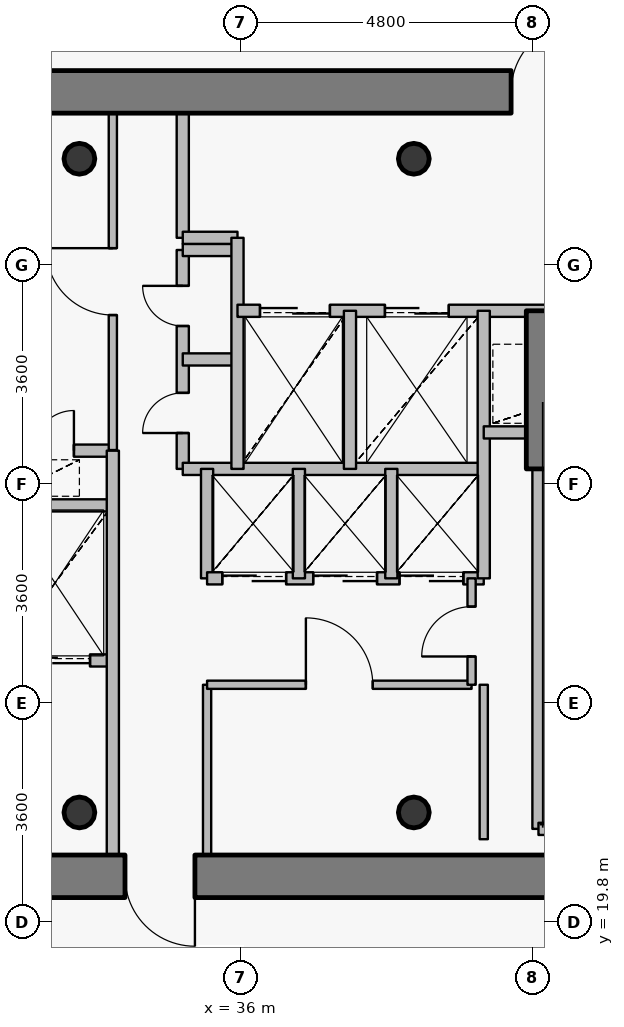
"""IFC4 building model, lengths in metres.
Left out: names, types, materials, properties, quantities, classifications, styles, units other than length and angle.
Written with IfcOpenShell. Run it as: python <this file> out.ifc"""

import sys

from ifc_helpers import new_model, si_unit, direction, frame, frame_2d, origin, origin_2d, place, context, subcontext, project, spatial, rectangle, hollow_circle, extrude, source, transform, mapped, element, fill, save


model = new_model("IFC4")
c1 = context("Model", 3, precision=1e-05, world=origin(), true_north=direction((0.0, 1.0)))
c2 = subcontext(c1, "Body", "Model", "MODEL_VIEW")
j1 = project(units=[si_unit("LENGTHUNIT", "METRE"), si_unit("PLANEANGLEUNIT", "RADIAN")], contexts=[c1])
p1 = place(None, origin())
s1 = spatial("IfcSite", under=j1, at=p1, CompositionType="ELEMENT")
p2 = place(p1, origin())
s2 = spatial("IfcBuilding", under=s1, at=p2, CompositionType="ELEMENT")
p3 = place(p2, frame((0.0, 0.0, 359.4)))
s3 = spatial("IfcBuildingStorey", under=s2, at=p3, CompositionType="ELEMENT", Elevation=359.4)
for number, where, z_axis, x_axis in (
    (1, (33.35, 21.6, 0.0), (0.0, 0.0, 1.0), (1.0, 0.0, 0.0)),
    (2, (38.85, 21.6, 0.0), (0.0, 0.0, 1.0), (1.0, 0.0, 0.0)),
    (3, (38.85, 32.35, 0.0), (0.0, 0.0, 1.0), (1.0, 0.0, 0.0)),
    (4, (33.35, 32.35, 0.0), (0.0, 0.0, 1.0), (1.0, 0.0, 0.0)),
):
    element("IfcColumn", number, at=place(p3, frame(where, z_axis=z_axis, x_axis=x_axis)), inside=s3, PredefinedType="COLUMN", context=c2, shape_type="SweptSolid", body=[
        extrude(hollow_circle(Radius=0.254, WallThickness=0.02, at=origin_2d()), origin(), (0.0, 0.0, 1.0), 4.2),
    ])
p4 = place(p3, frame((27.6, 33.45, 0.0), z_axis=(0.0, 0.0, 1.0), x_axis=(1.0, 0.0, 0.0)))
e5 = element("IfcWall", 5, at=p4, inside=s3, PredefinedType="SHEAR", context=c2, shape_type="SweptSolid", body=[
    extrude(rectangle(XDim=16.8, YDim=0.7, at=frame_2d((8.4, 0.0))), origin(), (0.0, 0.0, 1.0), 3.45),
])
p5 = place(p4, frame((12.85, 0.0, 0.0)))
e6 = element("IfcOpeningElement", 6, at=p5, cuts=e5, PredefinedType="OPENING", context=c2, shape_type="SweptSolid", body=[
    extrude(rectangle(XDim=1.15, YDim=2.15, at=origin_2d()), frame((0.575, 0.36, 1.075), z_axis=(0.0, -1.0, 0.0), x_axis=(1.0, 0.0, 0.0)), (0.0, 0.0, 1.0), 0.72),
])
p6 = place(p3, frame((44.4, 20.55, 0.0), z_axis=(0.0, 0.0, 1.0), x_axis=(-1.0, 0.0, 0.0)))
e7 = element("IfcWall", 7, at=p6, inside=s3, PredefinedType="SHEAR", context=c2, shape_type="SweptSolid", body=[
    extrude(rectangle(XDim=16.8, YDim=0.7, at=frame_2d((8.4, 0.0))), origin(), (0.0, 0.0, 1.0), 3.45),
])
p7 = place(p6, frame((13.0, 0.0, 0.0)))
e8 = element("IfcOpeningElement", 8, at=p7, cuts=e7, PredefinedType="OPENING", context=c2, shape_type="SweptSolid", body=[
    extrude(rectangle(XDim=1.15, YDim=2.15, at=origin_2d()), frame((0.575, 0.36, 1.075), z_axis=(0.0, -1.0, 0.0), x_axis=(1.0, 0.0, 0.0)), (0.0, 0.0, 1.0), 0.72),
])
p8 = place(p6, frame((9.15, 0.0, 0.0)))
e9 = element("IfcOpeningElement", 9, at=p8, cuts=e7, PredefinedType="OPENING", context=c2, shape_type="SweptSolid", body=[
    extrude(rectangle(XDim=1.15, YDim=2.15, at=origin_2d()), frame((0.575, 0.36, 1.075), z_axis=(0.0, -1.0, 0.0), x_axis=(1.0, 0.0, 0.0)), (0.0, 0.0, 1.0), 0.72),
])
p9 = place(p3, frame((40.9, 27.25, 0.0), z_axis=(0.0, 0.0, 1.0), x_axis=(0.0, 1.0, 0.0)))
e10 = element("IfcWall", 10, at=p9, inside=s3, PredefinedType="SHEAR", context=c2, shape_type="SweptSolid", body=[
    extrude(rectangle(XDim=2.6, YDim=0.4, at=frame_2d((1.3, 0.0))), origin(), (0.0, 0.0, 1.0), 3.5),
])
p10 = place(p3, frame((31.1, 27.55, 0.0), z_axis=(0.0, 0.0, 1.0), x_axis=(1.0, 0.0, 0.0)))
e11 = element("IfcWall", 11, at=p10, inside=s3, PredefinedType="PARTITIONING", context=c2, shape_type="SweptSolid", body=[
    extrude(rectangle(XDim=2.8, YDim=0.2, at=frame_2d((1.4, 0.0))), origin(), (0.0, 0.0, 1.0), 3.485),
])
p11 = place(p10, frame((1.5, 0.0, 0.0)))
e12 = element("IfcOpeningElement", 12, at=p11, cuts=e11, PredefinedType="OPENING", context=c2, shape_type="SweptSolid", body=[
    extrude(rectangle(XDim=0.66, YDim=2.05, at=origin_2d()), frame((0.33, 0.11, 1.025), z_axis=(0.0, -1.0, 0.0), x_axis=(1.0, 0.0, 0.0)), (0.0, 0.0, 1.0), 0.22),
])
p12 = place(p3, frame((32.0, 24.1, 0.0), z_axis=(0.0, 0.0, 1.0), x_axis=(1.0, 0.0, 0.0)))
e13 = element("IfcWall", 13, at=p12, inside=s3, PredefinedType="PARTITIONING", context=c2, shape_type="SweptSolid", body=[
    extrude(rectangle(XDim=1.9, YDim=0.2, at=frame_2d((0.95, 0.0))), origin(), (0.0, 0.0, 1.0), 3.485),
])
p13 = place(p12, frame((0.375, 0.0, 0.0)))
e14 = element("IfcOpeningElement", 14, at=p13, cuts=e13, PredefinedType="OPENING", context=c2, shape_type="SweptSolid", body=[
    extrude(rectangle(XDim=1.15, YDim=2.15, at=origin_2d()), frame((0.575, 0.11, 1.075), z_axis=(0.0, -1.0, 0.0), x_axis=(1.0, 0.0, 0.0)), (0.0, 0.0, 1.0), 0.22),
])
p14 = place(p3, frame((32.0, 26.65, 0.0), z_axis=(0.0, 0.0, 1.0), x_axis=(1.0, 0.0, 0.0)))
e15 = element("IfcWall", 15, at=p14, inside=s3, PredefinedType="PARTITIONING", context=c2, shape_type="SweptSolid", body=[
    extrude(rectangle(XDim=1.9, YDim=0.2, at=frame_2d((0.95, 0.0))), origin(), (0.0, 0.0, 1.0), 3.485),
])
p15 = place(p3, frame((33.9, 20.9, 0.0), z_axis=(0.0, 0.0, 1.0), x_axis=(0.0, 1.0, 0.0)))
e16 = element("IfcWall", 16, at=p15, inside=s3, PredefinedType="PARTITIONING", context=c2, shape_type="SweptSolid", body=[
    extrude(rectangle(XDim=6.65, YDim=0.2, at=frame_2d((3.325, 0.0))), origin(), (0.0, 0.0, 1.0), 3.485),
])
p16 = place(p3, frame((33.9, 27.56, 0.0), z_axis=(0.0, 0.0, 1.0), x_axis=(0.0, 1.0, 0.0)))
e17 = element("IfcWall", 17, at=p16, inside=s3, PredefinedType="PARTITIONING", context=c2, shape_type="SweptSolid", body=[
    extrude(rectangle(XDim=5.54, YDim=0.135, at=frame_2d((2.77, 0.0))), origin(), (0.0, 0.0, 1.0), 3.485),
])
p17 = place(p16, frame((2.22, 0.0, 0.0)))
e18 = element("IfcOpeningElement", 18, at=p17, cuts=e17, PredefinedType="OPENING", context=c2, shape_type="SweptSolid", body=[
    extrude(rectangle(XDim=1.1, YDim=2.15, at=origin_2d()), frame((0.55, 0.078, 1.075), z_axis=(0.0, -1.0, 0.0), x_axis=(1.0, 0.0, 0.0)), (0.0, 0.0, 1.0), 0.155),
])
p18 = place(p3, frame((35.05, 27.25, 0.0), z_axis=(0.0, 0.0, 1.0), x_axis=(0.0, 1.0, 0.0)))
e19 = element("IfcWall", 19, at=p18, inside=s3, PredefinedType="PARTITIONING", context=c2, shape_type="SweptSolid", body=[
    extrude(rectangle(XDim=3.6, YDim=0.2, at=frame_2d((1.8, 0.0))), origin(), (0.0, 0.0, 1.0), 3.9),
])
p19 = place(p18, frame((0.59, 0.0, 0.0)))
e20 = element("IfcOpeningElement", 20, at=p19, cuts=e19, PredefinedType="OPENING", context=c2, shape_type="SweptSolid", body=[
    extrude(rectangle(XDim=0.66, YDim=2.05, at=origin_2d()), frame((0.33, 0.11, 1.025), z_axis=(0.0, -1.0, 0.0), x_axis=(1.0, 0.0, 0.0)), (0.0, 0.0, 1.0), 0.22),
])
p20 = place(p18, frame((2.35, 0.0, 0.0)))
e21 = element("IfcOpeningElement", 21, at=p20, cuts=e19, PredefinedType="OPENING", context=c2, shape_type="SweptSolid", body=[
    extrude(rectangle(XDim=0.66, YDim=2.05, at=origin_2d()), frame((0.33, 0.11, 1.025), z_axis=(0.0, -1.0, 0.0), x_axis=(1.0, 0.0, 0.0)), (0.0, 0.0, 1.0), 0.22),
])
p21 = place(p3, frame((35.05, 27.25, 0.0), z_axis=(0.0, 0.0, 1.0), x_axis=(1.0, 0.0, 0.0)))
e22 = element("IfcWall", 22, at=p21, inside=s3, PredefinedType="PARTITIONING", context=c2, shape_type="SweptSolid", body=[
    extrude(rectangle(XDim=4.95, YDim=0.2, at=frame_2d((2.475, 0.0))), origin(), (0.0, 0.0, 1.0), 3.485),
])
for number, where, z_axis, x_axis in (
    (23, (35.05, 29.05, 0.0), (0.0, 0.0, 1.0), (1.0, 0.0, 0.0)),
    (24, (35.05, 30.85, 0.0), (0.0, 0.0, 1.0), (1.0, 0.0, 0.0)),
):
    element("IfcWall", number, at=place(p3, frame(where, z_axis=z_axis, x_axis=x_axis)), inside=s3, PredefinedType="PARTITIONING", context=c2, shape_type="SweptSolid", body=[
        extrude(rectangle(XDim=0.9, YDim=0.2, at=frame_2d((0.45, 0.0))), origin(), (0.0, 0.0, 1.0), 3.9),
    ])
p22 = place(p3, frame((35.05, 31.05, 0.0), z_axis=(0.0, 0.0, 1.0), x_axis=(0.0, 1.0, 0.0)))
e25 = element("IfcWall", 25, at=p22, inside=s3, PredefinedType="PARTITIONING", context=c2, shape_type="SweptSolid", body=[
    extrude(rectangle(XDim=2.05, YDim=0.2, at=frame_2d((1.025, 0.0))), origin(), (0.0, 0.0, 1.0), 3.485),
])
p23 = place(p3, frame((35.05, 31.05, 0.0), z_axis=(0.0, 0.0, 1.0), x_axis=(1.0, 0.0, 0.0)))
e26 = element("IfcWall", 26, at=p23, inside=s3, PredefinedType="PARTITIONING", context=c2, shape_type="SweptSolid", body=[
    extrude(rectangle(XDim=0.9, YDim=0.2, at=frame_2d((0.45, 0.0))), origin(), (0.0, 0.0, 1.0), 3.9),
])
p24 = place(p3, frame((35.45, 20.9, 0.0), z_axis=(0.0, 0.0, 1.0), x_axis=(0.0, 1.0, 0.0)))
e27 = element("IfcWall", 27, at=p24, inside=s3, PredefinedType="PARTITIONING", context=c2, shape_type="SweptSolid", body=[
    extrude(rectangle(XDim=2.8, YDim=0.135, at=frame_2d((1.4, 0.0))), origin(), (0.0, 0.0, 1.0), 3.485),
])
p25 = place(p3, frame((35.45, 23.7, 0.0), z_axis=(0.0, 0.0, 1.0), x_axis=(1.0, 0.0, 0.0)))
e28 = element("IfcWall", 28, at=p25, inside=s3, PredefinedType="PARTITIONING", context=c2, shape_type="SweptSolid", body=[
    extrude(rectangle(XDim=4.35, YDim=0.135, at=frame_2d((2.175, 0.0))), origin(), (0.0, 0.0, 1.0), 3.485),
])
p26 = place(p25, frame((1.625, 0.0, 0.0)))
e29 = element("IfcOpeningElement", 29, at=p26, cuts=e28, PredefinedType="OPENING", context=c2, shape_type="SweptSolid", body=[
    extrude(rectangle(XDim=1.1, YDim=2.15, at=origin_2d()), frame((0.55, 0.078, 1.075), z_axis=(0.0, -1.0, 0.0), x_axis=(1.0, 0.0, 0.0)), (0.0, 0.0, 1.0), 0.155),
])
p27 = place(p3, frame((35.45, 25.45, 0.0), z_axis=(0.0, 0.0, 1.0), x_axis=(0.0, 1.0, 0.0)))
e30 = element("IfcWall", 30, at=p27, inside=s3, PredefinedType="PARTITIONING", context=c2, shape_type="SweptSolid", body=[
    extrude(rectangle(XDim=1.8, YDim=0.2, at=frame_2d((0.9, 0.0))), origin(), (0.0, 0.0, 1.0), 3.9),
])
p28 = place(p3, frame((35.45, 25.45, 0.0), z_axis=(0.0, 0.0, 1.0), x_axis=(1.0, 0.0, 0.0)))
e31 = element("IfcWall", 31, at=p28, inside=s3, PredefinedType="PARTITIONING", context=c2, shape_type="SweptSolid", body=[
    extrude(rectangle(XDim=4.55, YDim=0.2, at=frame_2d((2.275, 0.0))), origin(), (0.0, 0.0, 1.0), 3.485),
])
p29 = place(p28, frame((0.25, 0.0, 0.0)))
e32 = element("IfcOpeningElement", 32, at=p29, cuts=e31, PredefinedType="OPENING", context=c2, shape_type="SweptSolid", body=[
    extrude(rectangle(XDim=1.05, YDim=2.15, at=origin_2d()), frame((0.525, 0.11, 1.075), z_axis=(0.0, -1.0, 0.0), x_axis=(1.0, 0.0, 0.0)), (0.0, 0.0, 1.0), 0.22),
])
p30 = place(p28, frame((1.745, 0.0, 0.0)))
e33 = element("IfcOpeningElement", 33, at=p30, cuts=e31, PredefinedType="OPENING", context=c2, shape_type="SweptSolid", body=[
    extrude(rectangle(XDim=1.05, YDim=2.15, at=origin_2d()), frame((0.525, 0.11, 1.075), z_axis=(0.0, -1.0, 0.0), x_axis=(1.0, 0.0, 0.0)), (0.0, 0.0, 1.0), 0.22),
])
p31 = place(p28, frame((3.165, 0.0, 0.0)))
e34 = element("IfcOpeningElement", 34, at=p31, cuts=e31, PredefinedType="OPENING", context=c2, shape_type="SweptSolid", body=[
    extrude(rectangle(XDim=1.05, YDim=2.15, at=origin_2d()), frame((0.525, 0.11, 1.075), z_axis=(0.0, -1.0, 0.0), x_axis=(1.0, 0.0, 0.0)), (0.0, 0.0, 1.0), 0.22),
])
p32 = place(p3, frame((35.95, 27.25, 0.0), z_axis=(0.0, 0.0, 1.0), x_axis=(0.0, 1.0, 0.0)))
e35 = element("IfcWall", 35, at=p32, inside=s3, PredefinedType="PARTITIONING", context=c2, shape_type="SweptSolid", body=[
    extrude(rectangle(XDim=3.8, YDim=0.2, at=frame_2d((1.9, 0.0))), origin(), (0.0, 0.0, 1.0), 3.9),
])
p33 = place(p3, frame((35.95, 29.85, 0.0), z_axis=(0.0, 0.0, 1.0), x_axis=(1.0, 0.0, 0.0)))
e36 = element("IfcWall", 36, at=p33, inside=s3, PredefinedType="PARTITIONING", context=c2, shape_type="SweptSolid", body=[
    extrude(rectangle(XDim=8.49, YDim=0.2, at=frame_2d((4.245, 0.0))), origin(), (0.0, 0.0, 1.0), 3.485),
])
p34 = place(p33, frame((6.1, 0.0, 0.0)))
e37 = element("IfcOpeningElement", 37, at=p34, cuts=e36, PredefinedType="OPENING", context=c2, shape_type="SweptSolid", body=[
    extrude(rectangle(XDim=1.2, YDim=2.15, at=origin_2d()), frame((0.6, 0.11, 1.075), z_axis=(0.0, -1.0, 0.0), x_axis=(1.0, 0.0, 0.0)), (0.0, 0.0, 1.0), 0.22),
])
p35 = place(p33, frame((0.37, 0.0, 0.0)))
e38 = element("IfcOpeningElement", 38, at=p35, cuts=e36, PredefinedType="OPENING", context=c2, shape_type="SweptSolid", body=[
    extrude(rectangle(XDim=1.15, YDim=2.15, at=origin_2d()), frame((0.575, 0.11, 1.075), z_axis=(0.0, -1.0, 0.0), x_axis=(1.0, 0.0, 0.0)), (0.0, 0.0, 1.0), 0.22),
])
p36 = place(p33, frame((2.425, 0.0, 0.0)))
e39 = element("IfcOpeningElement", 39, at=p36, cuts=e36, PredefinedType="OPENING", context=c2, shape_type="SweptSolid", body=[
    extrude(rectangle(XDim=1.05, YDim=2.15, at=origin_2d()), frame((0.525, 0.11, 1.075), z_axis=(0.0, -1.0, 0.0), x_axis=(1.0, 0.0, 0.0)), (0.0, 0.0, 1.0), 0.22),
])
p37 = place(p3, frame((36.96, 25.45, 0.0), z_axis=(0.0, 0.0, 1.0), x_axis=(0.0, 1.0, 0.0)))
e40 = element("IfcWall", 40, at=p37, inside=s3, PredefinedType="PARTITIONING", context=c2, shape_type="SweptSolid", body=[
    extrude(rectangle(XDim=1.8, YDim=0.2, at=frame_2d((0.9, 0.0))), origin(), (0.0, 0.0, 1.0), 3.9),
])
p38 = place(p3, frame((37.8, 27.25, 0.0), z_axis=(0.0, 0.0, 1.0), x_axis=(0.0, 1.0, 0.0)))
e41 = element("IfcWall", 41, at=p38, inside=s3, PredefinedType="PARTITIONING", context=c2, shape_type="SweptSolid", body=[
    extrude(rectangle(XDim=2.6, YDim=0.2, at=frame_2d((1.3, 0.0))), origin(), (0.0, 0.0, 1.0), 3.9),
])
p39 = place(p3, frame((38.48, 25.45, 0.0), z_axis=(0.0, 0.0, 1.0), x_axis=(0.0, 1.0, 0.0)))
e42 = element("IfcWall", 42, at=p39, inside=s3, PredefinedType="PARTITIONING", context=c2, shape_type="SweptSolid", body=[
    extrude(rectangle(XDim=1.8, YDim=0.2, at=frame_2d((0.9, 0.0))), origin(), (0.0, 0.0, 1.0), 3.9),
])
p40 = place(p3, frame((39.8, 23.7, 0.0), z_axis=(0.0, 0.0, 1.0), x_axis=(0.0, 1.0, 0.0)))
e43 = element("IfcWall", 43, at=p40, inside=s3, PredefinedType="PARTITIONING", context=c2, shape_type="SweptSolid", body=[
    extrude(rectangle(XDim=1.75, YDim=0.135, at=frame_2d((0.875, 0.0))), origin(), (0.0, 0.0, 1.0), 3.9),
])
p41 = place(p40, frame((0.465, 0.0, 0.0)))
e44 = element("IfcOpeningElement", 44, at=p41, cuts=e43, PredefinedType="OPENING", context=c2, shape_type="SweptSolid", body=[
    extrude(rectangle(XDim=0.82, YDim=2.1, at=origin_2d()), frame((0.41, 0.078, 1.05), z_axis=(0.0, -1.0, 0.0), x_axis=(1.0, 0.0, 0.0)), (0.0, 0.0, 1.0), 0.155),
])
p42 = place(p3, frame((40.0, 25.45, 0.0), z_axis=(0.0, 0.0, 1.0), x_axis=(0.0, 1.0, 0.0)))
e45 = element("IfcWall", 45, at=p42, inside=s3, PredefinedType="PARTITIONING", context=c2, shape_type="SweptSolid", body=[
    extrude(rectangle(XDim=4.4, YDim=0.2, at=frame_2d((2.2, 0.0))), origin(), (0.0, 0.0, 1.0), 3.9),
])
p43 = place(p3, frame((40.0, 27.85, 0.0), z_axis=(0.0, 0.0, 1.0), x_axis=(1.0, 0.0, 0.0)))
e46 = element("IfcWall", 46, at=p43, inside=s3, PredefinedType="PARTITIONING", context=c2, shape_type="SweptSolid", body=[
    extrude(rectangle(XDim=0.9, YDim=0.2, at=frame_2d((0.45, 0.0))), origin(), (0.0, 0.0, 1.0), 3.9),
])
p44 = place(p3, frame((40.9, 21.33, 0.0), z_axis=(0.0, 0.0, 1.0), x_axis=(0.0, 1.0, 0.0)))
e47 = element("IfcWall", 47, at=p44, inside=s3, PredefinedType="PARTITIONING", context=c2, shape_type="SweptSolid", body=[
    extrude(rectangle(XDim=5.91, YDim=0.2, at=frame_2d((2.955, 0.0))), origin(), (0.0, 0.0, 1.0), 3.435),
])
p45 = place(p3, frame((40.9, 21.33, 0.0), z_axis=(0.0, 0.0, 1.0), x_axis=(1.0, 0.0, 0.0)))
e48 = element("IfcWall", 48, at=p45, inside=s3, PredefinedType="PARTITIONING", context=c2, shape_type="SweptSolid", body=[
    extrude(rectangle(XDim=0.25, YDim=0.2, at=frame_2d((0.125, 0.0))), origin(), (0.0, 0.0, 1.0), 3.435),
])
p46 = place(p3, frame((40.0, 23.7, 0.0), z_axis=(0.0, 0.0, 1.0), x_axis=(0.0, -1.0, 0.0)))
e49 = element("IfcWall", 49, at=p46, inside=s3, PredefinedType="PARTITIONING", context=c2, shape_type="SweptSolid", body=[
    extrude(rectangle(XDim=2.54, YDim=0.135, at=frame_2d((1.27, 0.0))), origin(), (0.0, 0.0, 1.0), 3.435),
])
m1 = source(origin(), c2, "Body", "SweptSolid", [
    extrude(rectangle(XDim=1.15, YDim=2.15, at=origin_2d()), frame((0.575, 0.025, 1.075), z_axis=(0.0, -1.0, 0.0), x_axis=(1.0, 0.0, 0.0)), (0.0, 0.0, 1.0), 0.05),
])
p47 = place(p5, origin())
e50 = element("IfcDoor", 50, at=p47, inside=s3, OperationType="SINGLE_SWING_RIGHT", PredefinedType="DOOR", context=c2, shape_type="MappedRepresentation", body=[
    mapped(m1, transform((0.0, 0.0, 0.0), x_axis=(1.0, 0.0, 0.0), y_axis=(0.0, 1.0, 0.0), z_axis=(0.0, 0.0, 1.0), scale=1.0)),
])
fill(e6, e50)
p48 = place(p8, origin())
e51 = element("IfcDoor", 51, at=p48, inside=s3, OperationType="SINGLE_SWING_LEFT", PredefinedType="DOOR", context=c2, shape_type="MappedRepresentation", body=[
    mapped(m1, transform((0.0, 0.0, 0.0), x_axis=(1.0, 0.0, 0.0), y_axis=(0.0, 1.0, 0.0), z_axis=(0.0, 0.0, 1.0), scale=1.0)),
])
fill(e9, e51)
m2 = source(origin(), c2, "Body", "SweptSolid", [
    extrude(rectangle(XDim=1.15, YDim=2.15, at=origin_2d()), frame((0.575, 0.025, 1.075), z_axis=(0.0, -1.0, 0.0), x_axis=(1.0, 0.0, 0.0)), (0.0, 0.0, 1.0), 0.05),
])
p49 = place(p35, origin())
e52 = element("IfcDoor", 52, at=p49, inside=s3, OperationType="DOUBLE_DOOR_SLIDING", PredefinedType="USERDEFINED", context=c2, shape_type="MappedRepresentation", body=[
    mapped(m2, transform((0.0, 0.0, 0.0), x_axis=(1.0, 0.0, 0.0), y_axis=(0.0, 1.0, 0.0), z_axis=(0.0, 0.0, 1.0), scale=1.0)),
])
fill(e38, e52)
p50 = place(p13, origin())
e53 = element("IfcDoor", 53, at=p50, inside=s3, OperationType="DOUBLE_DOOR_SLIDING", PredefinedType="USERDEFINED", context=c2, shape_type="MappedRepresentation", body=[
    mapped(m2, transform((0.0, 0.0, 0.0), x_axis=(1.0, 0.0, 0.0), y_axis=(0.0, 1.0, 0.0), z_axis=(0.0, 0.0, 1.0), scale=1.0)),
])
fill(e14, e53)
m3 = source(origin(), c2, "Body", "SweptSolid", [
    extrude(rectangle(XDim=1.05, YDim=2.15, at=origin_2d()), frame((0.525, 0.025, 1.075), z_axis=(0.0, -1.0, 0.0), x_axis=(1.0, 0.0, 0.0)), (0.0, 0.0, 1.0), 0.05),
])
p51 = place(p36, origin())
e54 = element("IfcDoor", 54, at=p51, inside=s3, OperationType="DOUBLE_DOOR_SLIDING", PredefinedType="USERDEFINED", context=c2, shape_type="MappedRepresentation", body=[
    mapped(m3, transform((0.0, 0.0, 0.0), x_axis=(1.0, 0.0, 0.0), y_axis=(0.0, 1.0, 0.0), z_axis=(0.0, 0.0, 1.0), scale=1.0)),
])
fill(e39, e54)
p52 = place(p29, origin())
e55 = element("IfcDoor", 55, at=p52, inside=s3, OperationType="DOUBLE_DOOR_SLIDING", PredefinedType="USERDEFINED", context=c2, shape_type="MappedRepresentation", body=[
    mapped(m3, transform((0.0, 0.0, 0.0), x_axis=(1.0, 0.0, 0.0), y_axis=(0.0, 1.0, 0.0), z_axis=(0.0, 0.0, 1.0), scale=1.0)),
])
fill(e32, e55)
p53 = place(p30, origin())
e56 = element("IfcDoor", 56, at=p53, inside=s3, OperationType="DOUBLE_DOOR_SLIDING", PredefinedType="USERDEFINED", context=c2, shape_type="MappedRepresentation", body=[
    mapped(m3, transform((0.0, 0.0, 0.0), x_axis=(1.0, 0.0, 0.0), y_axis=(0.0, 1.0, 0.0), z_axis=(0.0, 0.0, 1.0), scale=1.0)),
])
fill(e33, e56)
p54 = place(p31, origin())
e57 = element("IfcDoor", 57, at=p54, inside=s3, OperationType="DOUBLE_DOOR_SLIDING", PredefinedType="USERDEFINED", context=c2, shape_type="MappedRepresentation", body=[
    mapped(m3, transform((0.0, 0.0, 0.0), x_axis=(1.0, 0.0, 0.0), y_axis=(0.0, 1.0, 0.0), z_axis=(0.0, 0.0, 1.0), scale=1.0)),
])
fill(e34, e57)
m4 = source(origin(), c2, "Body", "SweptSolid", [
    extrude(rectangle(XDim=0.66, YDim=2.05, at=origin_2d()), frame((0.33, 0.025, 1.025), z_axis=(0.0, -1.0, 0.0), x_axis=(1.0, 0.0, 0.0)), (0.0, 0.0, 1.0), 0.05),
])
p55 = place(p19, origin())
e58 = element("IfcDoor", 58, at=p55, inside=s3, OperationType="SINGLE_SWING_LEFT", PredefinedType="USERDEFINED", context=c2, shape_type="MappedRepresentation", body=[
    mapped(m4, transform((0.0, 0.0, 0.0), x_axis=(1.0, 0.0, 0.0), y_axis=(0.0, 1.0, 0.0), z_axis=(0.0, 0.0, 1.0), scale=1.0)),
])
fill(e20, e58)
p56 = place(p20, origin())
e59 = element("IfcDoor", 59, at=p56, inside=s3, OperationType="SINGLE_SWING_RIGHT", PredefinedType="USERDEFINED", context=c2, shape_type="MappedRepresentation", body=[
    mapped(m4, transform((0.0, 0.0, 0.0), x_axis=(1.0, 0.0, 0.0), y_axis=(0.0, 1.0, 0.0), z_axis=(0.0, 0.0, 1.0), scale=1.0)),
])
fill(e21, e59)
m5 = source(origin(), c2, "Body", "SweptSolid", [
    extrude(rectangle(XDim=1.1, YDim=2.15, at=origin_2d()), frame((0.55, 0.025, 1.075), z_axis=(0.0, -1.0, 0.0), x_axis=(1.0, 0.0, 0.0)), (0.0, 0.0, 1.0), 0.05),
])
p57 = place(p26, origin())
e60 = element("IfcDoor", 60, at=p57, inside=s3, OperationType="SINGLE_SWING_LEFT", PredefinedType="DOOR", context=c2, shape_type="MappedRepresentation", body=[
    mapped(m5, transform((0.0, 0.0, 0.0), x_axis=(1.0, 0.0, 0.0), y_axis=(0.0, 1.0, 0.0), z_axis=(0.0, 0.0, 1.0), scale=1.0)),
])
fill(e29, e60)
p58 = place(p17, origin())
e61 = element("IfcDoor", 61, at=p58, inside=s3, OperationType="SINGLE_SWING_RIGHT", PredefinedType="DOOR", context=c2, shape_type="MappedRepresentation", body=[
    mapped(m5, transform((0.0, 0.0, 0.0), x_axis=(1.0, 0.0, 0.0), y_axis=(0.0, 1.0, 0.0), z_axis=(0.0, 0.0, 1.0), scale=1.0)),
])
fill(e18, e61)
m6 = source(origin(), c2, "Body", "SweptSolid", [
    extrude(rectangle(XDim=0.82, YDim=2.1, at=origin_2d()), frame((0.41, 0.025, 1.05), z_axis=(0.0, -1.0, 0.0), x_axis=(1.0, 0.0, 0.0)), (0.0, 0.0, 1.0), 0.05),
])
p59 = place(p41, origin())
e62 = element("IfcDoor", 62, at=p59, inside=s3, OperationType="SINGLE_SWING_LEFT", PredefinedType="DOOR", context=c2, shape_type="MappedRepresentation", body=[
    mapped(m6, transform((0.0, 0.0, 0.0), x_axis=(1.0, 0.0, 0.0), y_axis=(0.0, 1.0, 0.0), z_axis=(0.0, 0.0, 1.0), scale=1.0)),
])
fill(e44, e62)
p60 = place(p11, origin())
e63 = element("IfcDoor", 63, at=p60, inside=s3, OperationType="SINGLE_SWING_RIGHT", PredefinedType="USERDEFINED", context=c2, shape_type="MappedRepresentation", body=[
    mapped(m4, transform((0.0, 0.0, 0.0), x_axis=(1.0, 0.0, 0.0), y_axis=(0.0, 1.0, 0.0), z_axis=(0.0, 0.0, 1.0), scale=1.0)),
])
fill(e12, e63)
save(model, sys.argv[1])
